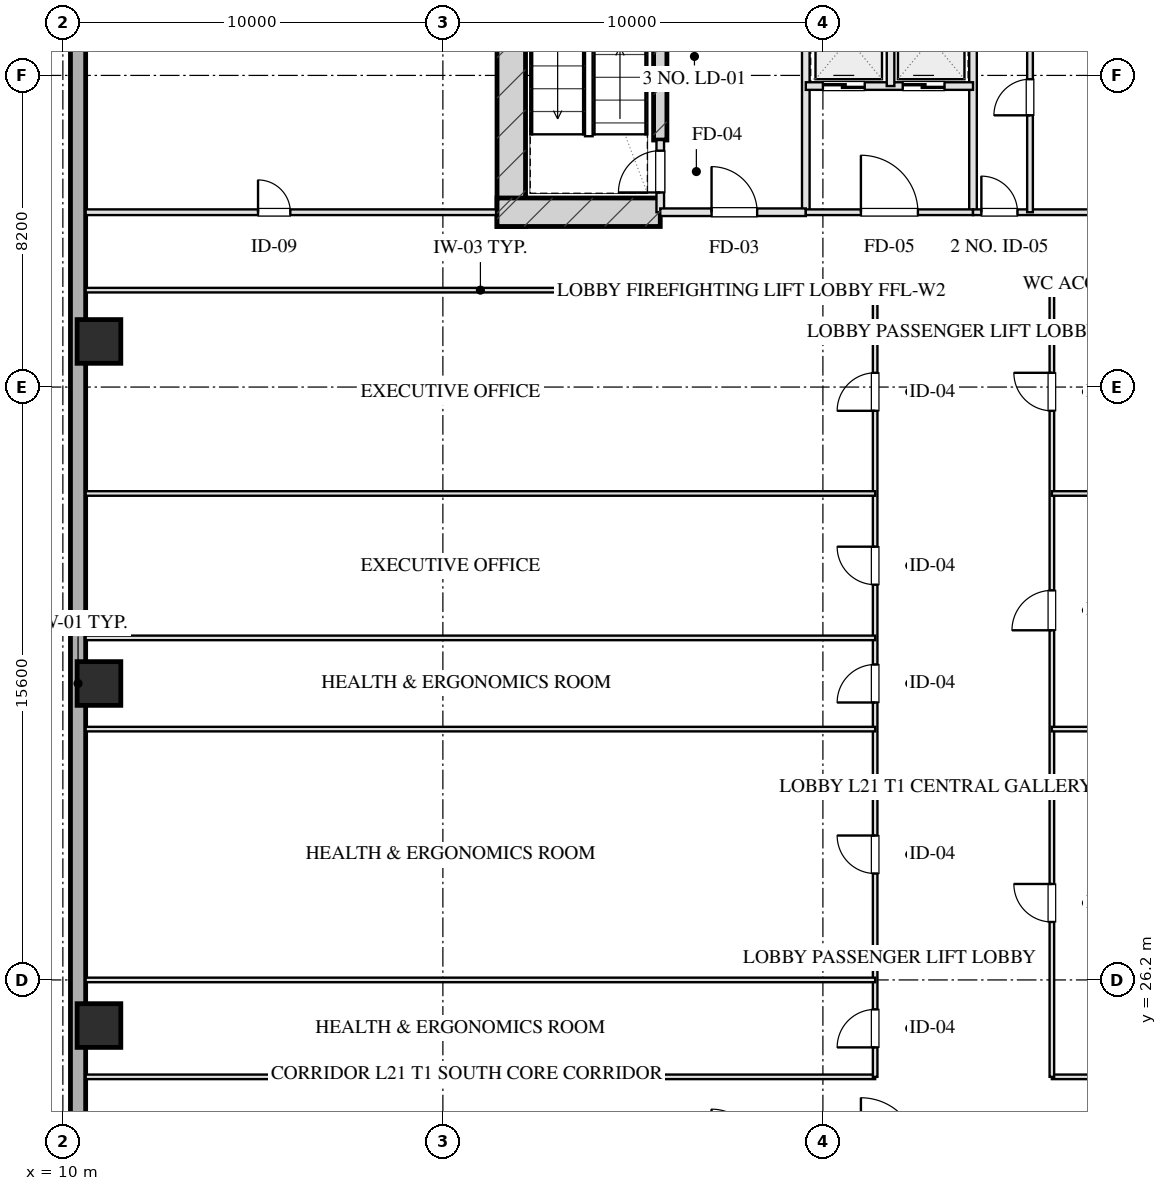
"""IFC4 building model, lengths in metres.
Left out: names, types, materials, properties, quantities, classifications, styles, units other than length and angle.
Written with IfcOpenShell. Run it as: python <this file> out.ifc"""

import sys

from ifc_helpers import new_model, si_unit, direction, frame, frame_2d, origin, origin_2d, place, context, subcontext, project, spatial, rectangle, hollow_rectangle, extrude, element, fill, save


model = new_model("IFC4")
c1 = context("Model", 3, precision=1e-05, world=origin(), true_north=direction((0.0, 1.0)))
c2 = subcontext(c1, "Body", "Model", "MODEL_VIEW")
j1 = project(units=[si_unit("LENGTHUNIT", "METRE"), si_unit("PLANEANGLEUNIT", "RADIAN")], contexts=[c1])
p1 = place(None, origin())
s1 = spatial("IfcSite", under=j1, at=p1, CompositionType="ELEMENT")
p2 = place(p1, origin())
s2 = spatial("IfcBuilding", under=s1, at=p2, CompositionType="ELEMENT")
p3 = place(p2, frame((0.0, 0.0, 85.1)))
s3 = spatial("IfcBuildingStorey", under=s2, at=p3, CompositionType="ELEMENT", Elevation=85.1)
p4 = place(p3, frame((21.8, 46.025, 0.0), z_axis=(0.0, 0.0, 1.0), x_axis=(0.0, 1.0, 0.0)))
e1 = element("IfcWall", 1, at=p4, inside=s3, PredefinedType="SHEAR", context=c2, shape_type="SweptSolid", body=[
    extrude(rectangle(XDim=9.63, YDim=0.75, at=frame_2d((4.815, 0.0))), origin(), (0.0, 0.0, 1.0), 3.45),
])
p5 = place(p3, frame((25.72, 48.3, 0.0), z_axis=(0.0, 0.0, 1.0), x_axis=(0.0, 1.0, 0.0)))
e2 = element("IfcWall", 2, at=p5, inside=s3, PredefinedType="SHEAR", context=c2, shape_type="SweptSolid", body=[
    extrude(rectangle(XDim=6.98, YDim=0.35, at=frame_2d((3.49, 0.0))), origin(), (0.0, 0.0, 1.0), 3.45),
])
p6 = place(p3, frame((21.425, 46.4, 0.0), z_axis=(0.0, 0.0, 1.0), x_axis=(1.0, 0.0, 0.0)))
e3 = element("IfcWall", 3, at=p6, inside=s3, PredefinedType="SHEAR", context=c2, shape_type="SweptSolid", body=[
    extrude(rectangle(XDim=4.295, YDim=0.75, at=frame_2d((2.147, 0.0))), origin(), (0.0, 0.0, 1.0), 3.45),
])
for number, where, z_axis, x_axis in (
    (4, (10.95, 25.0, 0.0), (0.0, 0.0, 1.0), (1.0, 0.0, 0.0)),
    (5, (10.95, 34.0, 0.0), (0.0, 0.0, 1.0), (1.0, 0.0, 0.0)),
    (6, (10.95, 43.0, 0.0), (0.0, 0.0, 1.0), (1.0, 0.0, 0.0)),
):
    element("IfcColumn", number, at=place(p3, frame(where, z_axis=z_axis, x_axis=x_axis)), inside=s3, PredefinedType="COLUMN", context=c2, shape_type="SweptSolid", body=[
        extrude(hollow_rectangle(XDim=1.15, YDim=1.15, WallThickness=0.04, at=origin_2d()), origin(), (0.0, 0.0, 1.0), 3.451),
    ])
p7 = place(p3, frame((10.4, 7.2, 0.0), z_axis=(0.0, 0.0, 1.0), x_axis=(0.0, 1.0, 0.0)))
e7 = element("IfcWall", 7, at=p7, inside=s3, PredefinedType="SOLIDWALL", context=c2, shape_type="SweptSolid", body=[
    extrude(rectangle(XDim=53.6, YDim=0.4, at=frame_2d((26.8, 0.0))), origin(), (0.0, 0.0, 1.0), 2.61),
])
p8 = place(p3, frame((25.72, 46.4, 0.0), z_axis=(0.0, 0.0, 1.0), x_axis=(0.0, 1.0, 0.0)))
e8 = element("IfcWall", 8, at=p8, inside=s3, PredefinedType="PARTITIONING", context=c2, shape_type="SweptSolid", body=[
    extrude(rectangle(XDim=1.9, YDim=0.2, at=frame_2d((0.95, 0.0))), origin(), (0.0, 0.0, 1.0), 3.175),
])
p9 = place(p8, frame((0.52, 0.0, 0.0)))
e9 = element("IfcOpeningElement", 9, at=p9, cuts=e8, PredefinedType="OPENING", context=c2, shape_type="SweptSolid", body=[
    extrude(rectangle(XDim=1.1, YDim=2.05, at=frame_2d((0.55, 1.025))), frame((0.0, 0.11, 0.0), z_axis=(0.0, -1.0, 0.0), x_axis=(1.0, 0.0, 0.0)), (0.0, 0.0, 1.0), 0.22),
])
p10 = place(p3, frame((29.55, 46.4, 0.0), z_axis=(0.0, 0.0, 1.0), x_axis=(0.0, 1.0, 0.0)))
e10 = element("IfcWall", 10, at=p10, inside=s3, PredefinedType="PARTITIONING", context=c2, shape_type="SweptSolid", body=[
    extrude(rectangle(XDim=8.43, YDim=0.2, at=frame_2d((4.215, 0.0))), origin(), (0.0, 0.0, 1.0), 3.175),
])
p11 = place(p3, frame((25.72, 46.4, 0.0), z_axis=(0.0, 0.0, 1.0), x_axis=(1.0, 0.0, 0.0)))
e11 = element("IfcWall", 11, at=p11, inside=s3, PredefinedType="PARTITIONING", context=c2, shape_type="SweptSolid", body=[
    extrude(rectangle(XDim=3.83, YDim=0.2, at=frame_2d((1.915, 0.0))), origin(), (0.0, 0.0, 1.0), 3.175),
])
p12 = place(p11, frame((1.35, 0.0, 0.0)))
e12 = element("IfcOpeningElement", 12, at=p12, cuts=e11, PredefinedType="OPENING", context=c2, shape_type="SweptSolid", body=[
    extrude(rectangle(XDim=1.2, YDim=2.05, at=frame_2d((0.6, 1.025))), frame((0.0, 0.11, 0.0), z_axis=(0.0, -1.0, 0.0), x_axis=(1.0, 0.0, 0.0)), (0.0, 0.0, 1.0), 0.22),
])
p13 = place(p3, frame((33.95, 46.4, 0.0), z_axis=(0.0, 0.0, 1.0), x_axis=(0.0, 1.0, 0.0)))
e13 = element("IfcWall", 13, at=p13, inside=s3, PredefinedType="PARTITIONING", context=c2, shape_type="SweptSolid", body=[
    extrude(rectangle(XDim=8.43, YDim=0.2, at=frame_2d((4.215, 0.0))), origin(), (0.0, 0.0, 1.0), 3.175),
])
p14 = place(p3, frame((29.55, 46.4, 0.0), z_axis=(0.0, 0.0, 1.0), x_axis=(1.0, 0.0, 0.0)))
e14 = element("IfcWall", 14, at=p14, inside=s3, PredefinedType="PARTITIONING", context=c2, shape_type="SweptSolid", body=[
    extrude(rectangle(XDim=4.4, YDim=0.15, at=frame_2d((2.2, 0.0))), origin(), (0.0, 0.0, 1.0), 3.175),
])
p15 = place(p14, frame((1.45, 0.0, 0.0)))
e15 = element("IfcOpeningElement", 15, at=p15, cuts=e14, PredefinedType="OPENING", context=c2, shape_type="SweptSolid", body=[
    extrude(rectangle(XDim=1.5, YDim=2.05, at=frame_2d((0.75, 1.025))), frame((0.0, 0.085, 0.0), z_axis=(0.0, -1.0, 0.0), x_axis=(1.0, 0.0, 0.0)), (0.0, 0.0, 1.0), 0.17),
])
p16 = place(p3, frame((29.55, 49.72, 0.0), z_axis=(0.0, 0.0, 1.0), x_axis=(1.0, 0.0, 0.0)))
e16 = element("IfcWall", 16, at=p16, inside=s3, PredefinedType="PARTITIONING", context=c2, shape_type="SweptSolid", body=[
    extrude(rectangle(XDim=4.4, YDim=0.2, at=frame_2d((2.2, 0.0))), origin(), (0.0, 0.0, 1.0), 3.175),
])
p17 = place(p16, frame((0.45, 0.0, 0.0)))
e17 = element("IfcOpeningElement", 17, at=p17, cuts=e16, PredefinedType="OPENING", context=c2, shape_type="SweptSolid", body=[
    extrude(rectangle(XDim=1.1, YDim=2.05, at=frame_2d((0.55, 1.025))), frame((0.0, 0.11, 0.0), z_axis=(0.0, -1.0, 0.0), x_axis=(1.0, 0.0, 0.0)), (0.0, 0.0, 1.0), 0.22),
])
p18 = place(p16, frame((2.55, 0.0, 0.0)))
e18 = element("IfcOpeningElement", 18, at=p18, cuts=e16, PredefinedType="OPENING", context=c2, shape_type="SweptSolid", body=[
    extrude(rectangle(XDim=1.1, YDim=2.05, at=frame_2d((0.55, 1.025))), frame((0.0, 0.11, 0.0), z_axis=(0.0, -1.0, 0.0), x_axis=(1.0, 0.0, 0.0)), (0.0, 0.0, 1.0), 0.22),
])
p19 = place(p3, frame((31.78, 49.72, 0.0), z_axis=(0.0, 0.0, 1.0), x_axis=(0.0, 1.0, 0.0)))
e19 = element("IfcWall", 19, at=p19, inside=s3, PredefinedType="PARTITIONING", context=c2, shape_type="SweptSolid", body=[
    extrude(rectangle(XDim=5.11, YDim=0.2, at=frame_2d((2.555, 0.0))), origin(), (0.0, 0.0, 1.0), 3.175),
])
p20 = place(p3, frame((33.95, 46.4, 0.0), z_axis=(0.0, 0.0, 1.0), x_axis=(1.0, 0.0, 0.0)))
e20 = element("IfcWall", 20, at=p20, inside=s3, PredefinedType="PARTITIONING", context=c2, shape_type="SweptSolid", body=[
    extrude(rectangle(XDim=3.8, YDim=0.15, at=frame_2d((1.9, 0.0))), origin(), (0.0, 0.0, 1.0), 3.175),
])
p21 = place(p20, frame((0.22, 0.0, 0.0)))
e21 = element("IfcOpeningElement", 21, at=p21, cuts=e20, PredefinedType="OPENING", context=c2, shape_type="SweptSolid", body=[
    extrude(rectangle(XDim=0.95, YDim=2.05, at=frame_2d((0.475, 1.025))), frame((0.0, 0.085, 0.0), z_axis=(0.0, -1.0, 0.0), x_axis=(1.0, 0.0, 0.0)), (0.0, 0.0, 1.0), 0.17),
])
p22 = place(p3, frame((35.45, 46.4, 0.0), z_axis=(0.0, 0.0, 1.0), x_axis=(0.0, 1.0, 0.0)))
e22 = element("IfcWall", 22, at=p22, inside=s3, PredefinedType="PARTITIONING", context=c2, shape_type="SweptSolid", body=[
    extrude(rectangle(XDim=8.43, YDim=0.15, at=frame_2d((4.215, 0.0))), origin(), (0.0, 0.0, 1.0), 2.815),
])
p23 = place(p22, frame((2.55, 0.0, 0.0)))
e23 = element("IfcOpeningElement", 23, at=p23, cuts=e22, PredefinedType="OPENING", context=c2, shape_type="SweptSolid", body=[
    extrude(rectangle(XDim=0.95, YDim=2.05, at=frame_2d((0.475, 1.025))), frame((0.0, 0.085, 0.0), z_axis=(0.0, -1.0, 0.0), x_axis=(1.0, 0.0, 0.0)), (0.0, 0.0, 1.0), 0.17),
])
p24 = place(p22, frame((5.8, 0.0, 0.0)))
e24 = element("IfcOpeningElement", 24, at=p24, cuts=e22, PredefinedType="OPENING", context=c2, shape_type="SweptSolid", body=[
    extrude(rectangle(XDim=0.9, YDim=2.05, at=frame_2d((0.45, 1.025))), frame((0.0, 0.085, 0.0), z_axis=(0.0, -1.0, 0.0), x_axis=(1.0, 0.0, 0.0)), (0.0, 0.0, 1.0), 0.17),
])
p25 = place(p3, frame((10.6, 46.4, 0.0), z_axis=(0.0, 0.0, 1.0), x_axis=(1.0, 0.0, 0.0)))
e25 = element("IfcWall", 25, at=p25, inside=s3, PredefinedType="PARTITIONING", context=c2, shape_type="SweptSolid", body=[
    extrude(rectangle(XDim=10.8, YDim=0.15, at=frame_2d((5.4, 0.0))), origin(), (0.0, 0.0, 1.0), 3.175),
])
p26 = place(p25, frame((4.536, 0.0, 0.0)))
e26 = element("IfcOpeningElement", 26, at=p26, cuts=e25, PredefinedType="OPENING", context=c2, shape_type="SweptSolid", body=[
    extrude(rectangle(XDim=0.85, YDim=2.05, at=frame_2d((0.425, 1.025))), frame((0.0, 0.085, 0.0), z_axis=(0.0, -1.0, 0.0), x_axis=(1.0, 0.0, 0.0)), (0.0, 0.0, 1.0), 0.17),
])
p27 = place(p3, frame((10.6, 23.65, 0.0), z_axis=(0.0, 0.0, 1.0), x_axis=(1.0, 0.0, 0.0)))
e27 = element("IfcWall", 27, at=p27, inside=s3, PredefinedType="PARTITIONING", context=c2, shape_type="SweptSolid", body=[
    extrude(rectangle(XDim=20.775, YDim=0.12, at=frame_2d((10.387, 0.0))), origin(), (0.0, 0.0, 1.0), 3.175),
])
p28 = place(p3, frame((36.025, 23.65, 0.0), z_axis=(0.0, 0.0, 1.0), x_axis=(1.0, 0.0, 0.0)))
e28 = element("IfcWall", 28, at=p28, inside=s3, PredefinedType="PARTITIONING", context=c2, shape_type="SweptSolid", body=[
    extrude(rectangle(XDim=13.375, YDim=0.12, at=frame_2d((6.688, 0.0))), origin(), (0.0, 0.0, 1.0), 3.175),
])
p29 = place(p3, frame((10.6, 44.35, 0.0), z_axis=(0.0, 0.0, 1.0), x_axis=(1.0, 0.0, 0.0)))
e29 = element("IfcWall", 29, at=p29, inside=s3, PredefinedType="PARTITIONING", context=c2, shape_type="SweptSolid", body=[
    extrude(rectangle(XDim=20.775, YDim=0.12, at=frame_2d((10.387, 0.0))), origin(), (0.0, 0.0, 1.0), 3.175),
])
p30 = place(p3, frame((36.025, 44.35, 0.0), z_axis=(0.0, 0.0, 1.0), x_axis=(1.0, 0.0, 0.0)))
e30 = element("IfcWall", 30, at=p30, inside=s3, PredefinedType="PARTITIONING", context=c2, shape_type="SweptSolid", body=[
    extrude(rectangle(XDim=13.375, YDim=0.12, at=frame_2d((6.688, 0.0))), origin(), (0.0, 0.0, 1.0), 3.175),
])
p31 = place(p3, frame((31.375, 23.65, 0.0), z_axis=(0.0, 0.0, 1.0), x_axis=(0.0, 1.0, 0.0)))
e31 = element("IfcWall", 31, at=p31, inside=s3, PredefinedType="PARTITIONING", context=c2, shape_type="SweptSolid", body=[
    extrude(rectangle(XDim=20.7, YDim=0.12, at=frame_2d((10.35, 0.0))), origin(), (0.0, 0.0, 1.0), 3.175),
])
p32 = place(p31, frame((0.775, 0.0, 0.0)))
e32 = element("IfcOpeningElement", 32, at=p32, cuts=e31, PredefinedType="OPENING", context=c2, shape_type="SweptSolid", body=[
    extrude(rectangle(XDim=1.0, YDim=2.05, at=frame_2d((0.5, 1.025))), frame((0.0, 0.07, 0.0), z_axis=(0.0, -1.0, 0.0), x_axis=(1.0, 0.0, 0.0)), (0.0, 0.0, 1.0), 0.14),
])
p33 = place(p31, frame((5.35, 0.0, 0.0)))
e33 = element("IfcOpeningElement", 33, at=p33, cuts=e31, PredefinedType="OPENING", context=c2, shape_type="SweptSolid", body=[
    extrude(rectangle(XDim=1.0, YDim=2.05, at=frame_2d((0.5, 1.025))), frame((0.0, 0.07, 0.0), z_axis=(0.0, -1.0, 0.0), x_axis=(1.0, 0.0, 0.0)), (0.0, 0.0, 1.0), 0.14),
])
p34 = place(p31, frame((9.85, 0.0, 0.0)))
e34 = element("IfcOpeningElement", 34, at=p34, cuts=e31, PredefinedType="OPENING", context=c2, shape_type="SweptSolid", body=[
    extrude(rectangle(XDim=1.0, YDim=2.05, at=frame_2d((0.5, 1.025))), frame((0.0, 0.07, 0.0), z_axis=(0.0, -1.0, 0.0), x_axis=(1.0, 0.0, 0.0)), (0.0, 0.0, 1.0), 0.14),
])
p35 = place(p31, frame((12.95, 0.0, 0.0)))
e35 = element("IfcOpeningElement", 35, at=p35, cuts=e31, PredefinedType="OPENING", context=c2, shape_type="SweptSolid", body=[
    extrude(rectangle(XDim=1.0, YDim=2.05, at=frame_2d((0.5, 1.025))), frame((0.0, 0.07, 0.0), z_axis=(0.0, -1.0, 0.0), x_axis=(1.0, 0.0, 0.0)), (0.0, 0.0, 1.0), 0.14),
])
p36 = place(p31, frame((17.525, 0.0, 0.0)))
e36 = element("IfcOpeningElement", 36, at=p36, cuts=e31, PredefinedType="OPENING", context=c2, shape_type="SweptSolid", body=[
    extrude(rectangle(XDim=1.0, YDim=2.05, at=frame_2d((0.5, 1.025))), frame((0.0, 0.07, 0.0), z_axis=(0.0, -1.0, 0.0), x_axis=(1.0, 0.0, 0.0)), (0.0, 0.0, 1.0), 0.14),
])
p37 = place(p3, frame((36.025, 23.65, 0.0), z_axis=(0.0, 0.0, 1.0), x_axis=(0.0, 1.0, 0.0)))
e37 = element("IfcWall", 37, at=p37, inside=s3, PredefinedType="PARTITIONING", context=c2, shape_type="SweptSolid", body=[
    extrude(rectangle(XDim=20.7, YDim=0.12, at=frame_2d((10.35, 0.0))), origin(), (0.0, 0.0, 1.0), 3.175),
])
p38 = place(p37, frame((4.075, 0.0, 0.0)))
e38 = element("IfcOpeningElement", 38, at=p38, cuts=e37, PredefinedType="OPENING", context=c2, shape_type="SweptSolid", body=[
    extrude(rectangle(XDim=1.0, YDim=2.05, at=frame_2d((0.5, 1.025))), frame((0.0, 0.07, 0.0), z_axis=(0.0, -1.0, 0.0), x_axis=(1.0, 0.0, 0.0)), (0.0, 0.0, 1.0), 0.14),
])
p39 = place(p37, frame((11.75, 0.0, 0.0)))
e39 = element("IfcOpeningElement", 39, at=p39, cuts=e37, PredefinedType="OPENING", context=c2, shape_type="SweptSolid", body=[
    extrude(rectangle(XDim=1.05, YDim=2.05, at=frame_2d((0.525, 1.025))), frame((0.0, 0.07, 0.0), z_axis=(0.0, -1.0, 0.0), x_axis=(1.0, 0.0, 0.0)), (0.0, 0.0, 1.0), 0.14),
])
p40 = place(p37, frame((17.525, 0.0, 0.0)))
e40 = element("IfcOpeningElement", 40, at=p40, cuts=e37, PredefinedType="OPENING", context=c2, shape_type="SweptSolid", body=[
    extrude(rectangle(XDim=1.0, YDim=2.05, at=frame_2d((0.5, 1.025))), frame((0.0, 0.07, 0.0), z_axis=(0.0, -1.0, 0.0), x_axis=(1.0, 0.0, 0.0)), (0.0, 0.0, 1.0), 0.14),
])
for number, where, z_axis, x_axis in (
    (41, (10.6, 26.2, 0.0), (0.0, 0.0, 1.0), (1.0, 0.0, 0.0)),
    (42, (10.6, 32.8, 0.0), (0.0, 0.0, 1.0), (1.0, 0.0, 0.0)),
    (43, (10.6, 35.2, 0.0), (0.0, 0.0, 1.0), (1.0, 0.0, 0.0)),
    (44, (10.6, 39.0, 0.0), (0.0, 0.0, 1.0), (1.0, 0.0, 0.0)),
):
    element("IfcWall", number, at=place(p3, frame(where, z_axis=z_axis, x_axis=x_axis)), inside=s3, PredefinedType="PARTITIONING", context=c2, shape_type="SweptSolid", body=[
        extrude(rectangle(XDim=20.775, YDim=0.12, at=frame_2d((10.387, 0.0))), origin(), (0.0, 0.0, 1.0), 3.175),
    ])
for number, where, z_axis, x_axis in (
    (45, (36.025, 32.8, 0.0), (0.0, 0.0, 1.0), (1.0, 0.0, 0.0)),
    (46, (36.025, 39.0, 0.0), (0.0, 0.0, 1.0), (1.0, 0.0, 0.0)),
):
    element("IfcWall", number, at=place(p3, frame(where, z_axis=z_axis, x_axis=x_axis)), inside=s3, PredefinedType="PARTITIONING", context=c2, shape_type="SweptSolid", body=[
        extrude(rectangle(XDim=13.375, YDim=0.12, at=frame_2d((6.688, 0.0))), origin(), (0.0, 0.0, 1.0), 3.175),
    ])
p41 = place(p9, origin())
e47 = element("IfcDoor", 47, at=p41, inside=s3, OperationType="SINGLE_SWING_LEFT", PredefinedType="DOOR", context=c2, shape_type="SweptSolid", body=[
    extrude(rectangle(XDim=1.1, YDim=2.05, at=frame_2d((0.55, 1.025))), frame((0.0, 0.025, 0.0), z_axis=(0.0, -1.0, 0.0), x_axis=(1.0, 0.0, 0.0)), (0.0, 0.0, 1.0), 0.05),
])
fill(e9, e47)
p42 = place(p12, origin())
e48 = element("IfcDoor", 48, at=p42, inside=s3, OperationType="SINGLE_SWING_LEFT", PredefinedType="DOOR", context=c2, shape_type="SweptSolid", body=[
    extrude(rectangle(XDim=1.2, YDim=2.05, at=frame_2d((0.6, 1.025))), frame((0.0, 0.025, 0.0), z_axis=(0.0, -1.0, 0.0), x_axis=(1.0, 0.0, 0.0)), (0.0, 0.0, 1.0), 0.05),
])
fill(e12, e48)
p43 = place(p15, origin())
e49 = element("IfcDoor", 49, at=p43, inside=s3, OperationType="SINGLE_SWING_LEFT", PredefinedType="DOOR", context=c2, shape_type="SweptSolid", body=[
    extrude(rectangle(XDim=1.5, YDim=2.05, at=frame_2d((0.75, 1.025))), frame((0.0, 0.025, 0.0), z_axis=(0.0, -1.0, 0.0), x_axis=(1.0, 0.0, 0.0)), (0.0, 0.0, 1.0), 0.05),
])
fill(e15, e49)
p44 = place(p17, origin())
e50 = element("IfcDoor", 50, at=p44, inside=s3, OperationType="DOUBLE_DOOR_SLIDING", PredefinedType="DOOR", context=c2, shape_type="SweptSolid", body=[
    extrude(rectangle(XDim=1.1, YDim=2.05, at=frame_2d((0.55, 1.025))), frame((0.0, 0.025, 0.0), z_axis=(0.0, -1.0, 0.0), x_axis=(1.0, 0.0, 0.0)), (0.0, 0.0, 1.0), 0.05),
])
fill(e17, e50)
p45 = place(p18, origin())
e51 = element("IfcDoor", 51, at=p45, inside=s3, OperationType="DOUBLE_DOOR_SLIDING", PredefinedType="DOOR", context=c2, shape_type="SweptSolid", body=[
    extrude(rectangle(XDim=1.1, YDim=2.05, at=frame_2d((0.55, 1.025))), frame((0.0, 0.025, 0.0), z_axis=(0.0, -1.0, 0.0), x_axis=(1.0, 0.0, 0.0)), (0.0, 0.0, 1.0), 0.05),
])
fill(e18, e51)
p46 = place(p21, origin())
e52 = element("IfcDoor", 52, at=p46, inside=s3, OperationType="SINGLE_SWING_LEFT", PredefinedType="DOOR", context=c2, shape_type="SweptSolid", body=[
    extrude(rectangle(XDim=0.95, YDim=2.05, at=frame_2d((0.475, 1.025))), frame((0.0, 0.025, 0.0), z_axis=(0.0, -1.0, 0.0), x_axis=(1.0, 0.0, 0.0)), (0.0, 0.0, 1.0), 0.05),
])
fill(e21, e52)
p47 = place(p23, origin())
e53 = element("IfcDoor", 53, at=p47, inside=s3, OperationType="SINGLE_SWING_LEFT", PredefinedType="DOOR", context=c2, shape_type="SweptSolid", body=[
    extrude(rectangle(XDim=0.95, YDim=2.05, at=frame_2d((0.475, 1.025))), frame((0.0, 0.025, 0.0), z_axis=(0.0, -1.0, 0.0), x_axis=(1.0, 0.0, 0.0)), (0.0, 0.0, 1.0), 0.05),
])
fill(e23, e53)
p48 = place(p26, origin())
e54 = element("IfcDoor", 54, at=p48, inside=s3, OperationType="SINGLE_SWING_LEFT", PredefinedType="DOOR", context=c2, shape_type="SweptSolid", body=[
    extrude(rectangle(XDim=0.85, YDim=2.05, at=frame_2d((0.425, 1.025))), frame((0.0, 0.025, 0.0), z_axis=(0.0, -1.0, 0.0), x_axis=(1.0, 0.0, 0.0)), (0.0, 0.0, 1.0), 0.05),
])
fill(e26, e54)
p49 = place(p32, origin())
e55 = element("IfcDoor", 55, at=p49, inside=s3, OperationType="SINGLE_SWING_LEFT", PredefinedType="DOOR", context=c2, shape_type="SweptSolid", body=[
    extrude(rectangle(XDim=1.0, YDim=2.05, at=frame_2d((0.5, 1.025))), frame((0.0, 0.025, 0.0), z_axis=(0.0, -1.0, 0.0), x_axis=(1.0, 0.0, 0.0)), (0.0, 0.0, 1.0), 0.05),
])
fill(e32, e55)
p50 = place(p33, origin())
e56 = element("IfcDoor", 56, at=p50, inside=s3, OperationType="SINGLE_SWING_RIGHT", PredefinedType="DOOR", context=c2, shape_type="SweptSolid", body=[
    extrude(rectangle(XDim=1.0, YDim=2.05, at=frame_2d((0.5, 1.025))), frame((0.0, 0.025, 0.0), z_axis=(0.0, -1.0, 0.0), x_axis=(1.0, 0.0, 0.0)), (0.0, 0.0, 1.0), 0.05),
])
fill(e33, e56)
p51 = place(p34, origin())
e57 = element("IfcDoor", 57, at=p51, inside=s3, OperationType="SINGLE_SWING_LEFT", PredefinedType="DOOR", context=c2, shape_type="SweptSolid", body=[
    extrude(rectangle(XDim=1.0, YDim=2.05, at=frame_2d((0.5, 1.025))), frame((0.0, 0.025, 0.0), z_axis=(0.0, -1.0, 0.0), x_axis=(1.0, 0.0, 0.0)), (0.0, 0.0, 1.0), 0.05),
])
fill(e34, e57)
p52 = place(p35, origin())
e58 = element("IfcDoor", 58, at=p52, inside=s3, OperationType="SINGLE_SWING_RIGHT", PredefinedType="DOOR", context=c2, shape_type="SweptSolid", body=[
    extrude(rectangle(XDim=1.0, YDim=2.05, at=frame_2d((0.5, 1.025))), frame((0.0, 0.025, 0.0), z_axis=(0.0, -1.0, 0.0), x_axis=(1.0, 0.0, 0.0)), (0.0, 0.0, 1.0), 0.05),
])
fill(e35, e58)
p53 = place(p36, origin())
e59 = element("IfcDoor", 59, at=p53, inside=s3, OperationType="SINGLE_SWING_LEFT", PredefinedType="DOOR", context=c2, shape_type="SweptSolid", body=[
    extrude(rectangle(XDim=1.0, YDim=2.05, at=frame_2d((0.5, 1.025))), frame((0.0, 0.025, 0.0), z_axis=(0.0, -1.0, 0.0), x_axis=(1.0, 0.0, 0.0)), (0.0, 0.0, 1.0), 0.05),
])
fill(e36, e59)
p54 = place(p38, origin())
e60 = element("IfcDoor", 60, at=p54, inside=s3, OperationType="SINGLE_SWING_RIGHT", PredefinedType="DOOR", context=c2, shape_type="SweptSolid", body=[
    extrude(rectangle(XDim=1.0, YDim=2.05, at=frame_2d((0.5, 1.025))), frame((0.0, 0.025, 0.0), z_axis=(0.0, -1.0, 0.0), x_axis=(1.0, 0.0, 0.0)), (0.0, 0.0, 1.0), 0.05),
])
fill(e38, e60)
p55 = place(p39, origin())
e61 = element("IfcDoor", 61, at=p55, inside=s3, OperationType="SINGLE_SWING_LEFT", PredefinedType="DOOR", context=c2, shape_type="SweptSolid", body=[
    extrude(rectangle(XDim=1.05, YDim=2.05, at=frame_2d((0.525, 1.025))), frame((0.0, 0.025, 0.0), z_axis=(0.0, -1.0, 0.0), x_axis=(1.0, 0.0, 0.0)), (0.0, 0.0, 1.0), 0.05),
])
fill(e39, e61)
p56 = place(p40, origin())
e62 = element("IfcDoor", 62, at=p56, inside=s3, OperationType="SINGLE_SWING_RIGHT", PredefinedType="DOOR", context=c2, shape_type="SweptSolid", body=[
    extrude(rectangle(XDim=1.0, YDim=2.05, at=frame_2d((0.5, 1.025))), frame((0.0, 0.025, 0.0), z_axis=(0.0, -1.0, 0.0), x_axis=(1.0, 0.0, 0.0)), (0.0, 0.0, 1.0), 0.05),
])
fill(e40, e62)
save(model, sys.argv[1])
